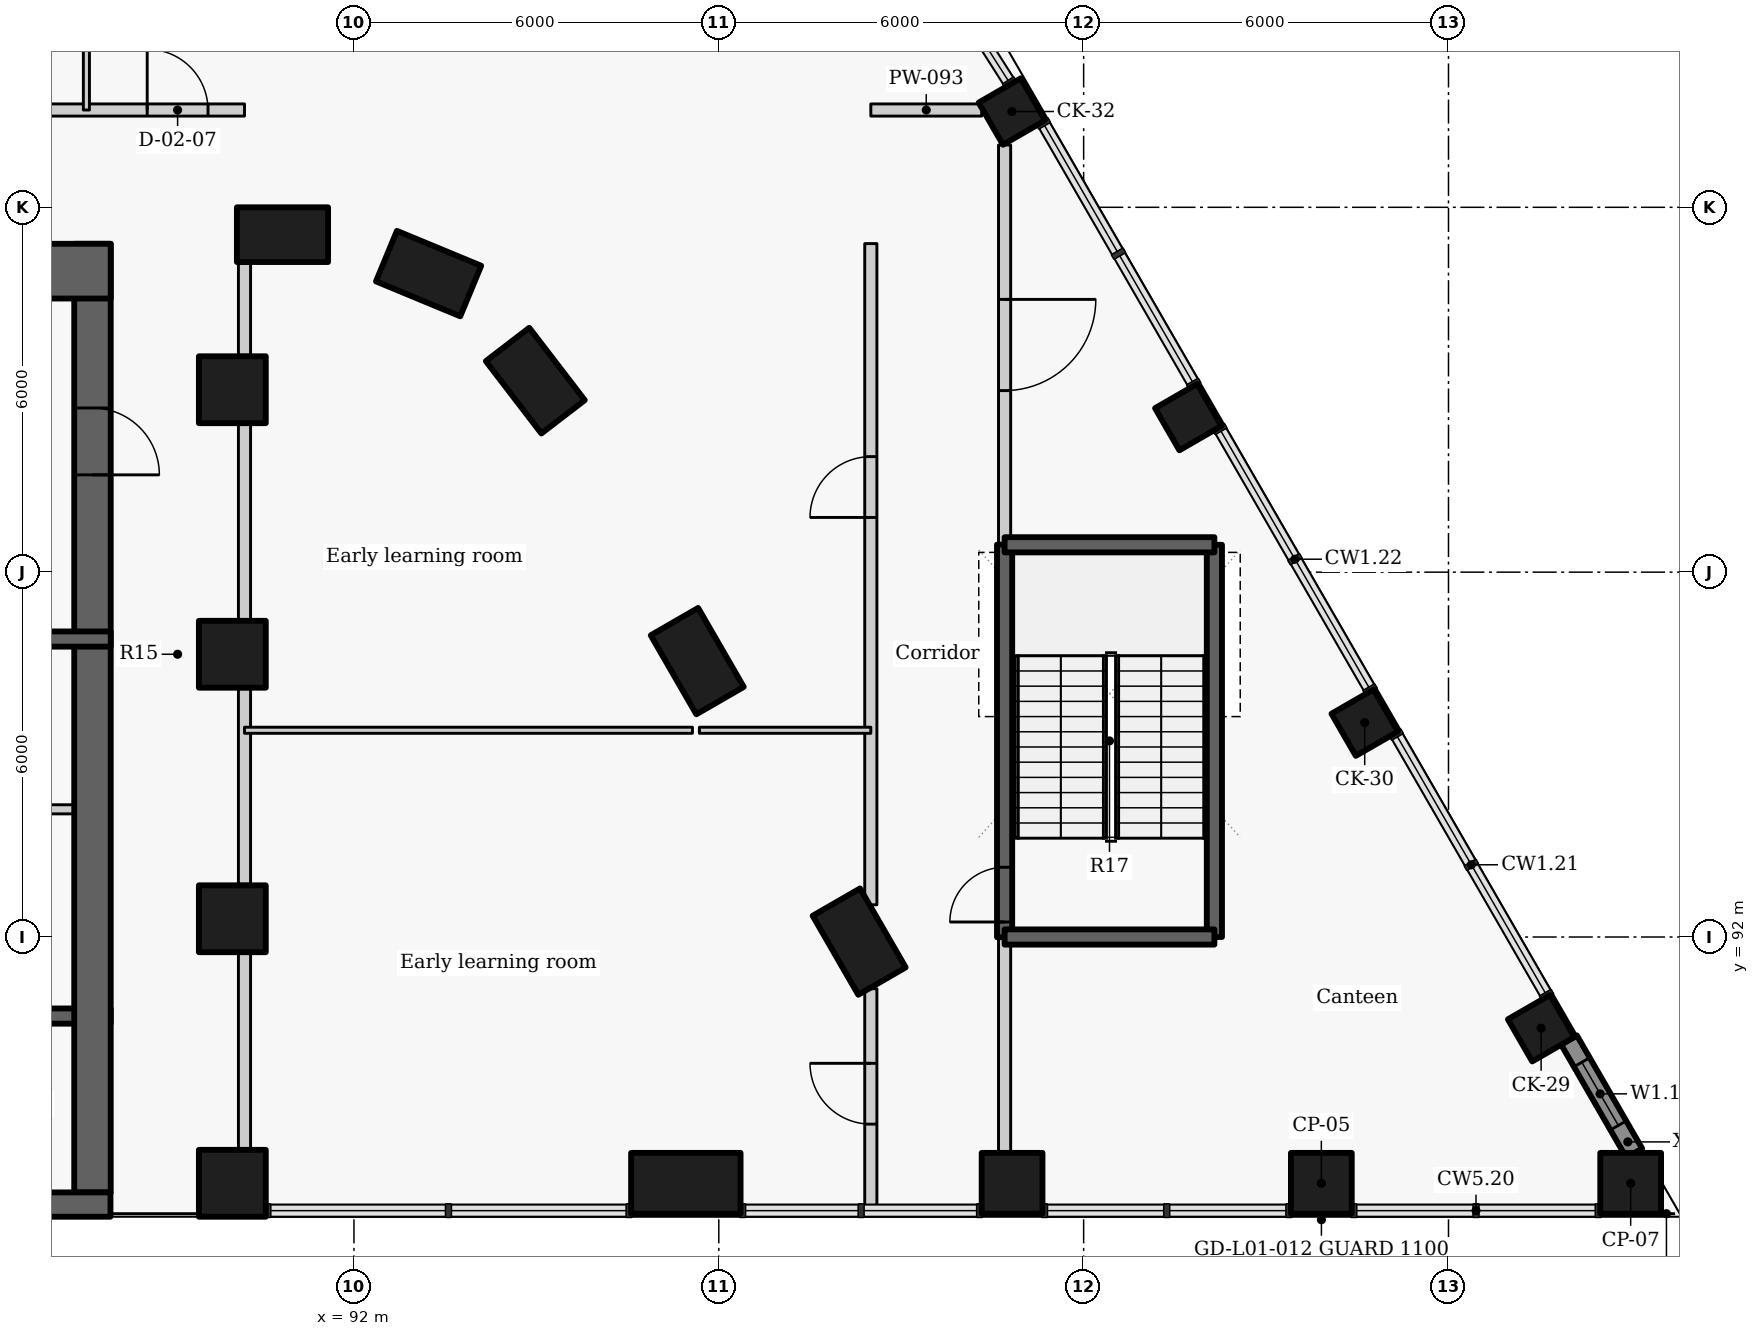
"""IFC4 building model, lengths in metres.
Left out: names, types, materials, properties, quantities, classifications, styles, units other than length and angle.
Written with IfcOpenShell. Run it as: python <this file> out.ifc"""

import sys

from ifc_helpers import new_model, si_unit, direction, frame, frame_2d, origin, origin_2d, place, context, subcontext, project, spatial, rectangle, extrude, element, fill, save


model = new_model("IFC4")
c1 = context("Model", 3, precision=1e-05, world=origin(), true_north=direction((0.0, 1.0)))
c2 = subcontext(c1, "Body", "Model", "MODEL_VIEW")
j1 = project(units=[si_unit("LENGTHUNIT", "METRE"), si_unit("PLANEANGLEUNIT", "RADIAN")], contexts=[c1])
p1 = place(None, origin())
s1 = spatial("IfcSite", under=j1, at=p1, CompositionType="ELEMENT")
p2 = place(p1, origin())
s2 = spatial("IfcBuilding", under=s1, at=p2, CompositionType="ELEMENT")
p3 = place(p2, frame((0.0, 0.0, 6.6)))
s3 = spatial("IfcBuildingStorey", under=s2, at=p3, CompositionType="ELEMENT", Elevation=6.6)
for number, where, z_axis, x_axis in (
    (1, (100.308, 91.925, 0.0), (0.0, 0.0, 1.0), (-0.5, 0.866, 0.0)),
    (2, (97.646, 96.537, 0.0), (0.0, 0.0, 1.0), (-0.5, 0.866, 0.0)),
    (3, (94.982, 101.149, 0.0), (0.0, 0.0, 1.0), (-0.609, 0.793, 0.0)),
    (4, (93.227, 102.91, 0.0), (0.0, 0.0, 1.0), (-0.924, 0.383, 0.0)),
    (5, (90.825, 103.55, 0.0), (0.0, 0.0, 1.0), (-1.0, 0.0, 0.0)),
):
    element("IfcColumn", number, at=place(p3, frame(where, z_axis=z_axis, x_axis=x_axis)), inside=s3, PredefinedType="COLUMN", context=c2, shape_type="SweptSolid", body=[
        extrude(rectangle(XDim=1.5, YDim=0.9, at=origin_2d()), origin(), (0.0, 0.0, 1.0), 4.8),
    ])
for number, where, z_axis, x_axis in (
    (6, (90.0, 87.95, 0.0), (0.0, 0.0, 1.0), (0.0, 1.0, 0.0)),
    (7, (90.0, 92.3, 0.0), (0.0, 0.0, 1.0), (0.0, 1.0, 0.0)),
    (8, (90.0, 96.65, 0.0), (0.0, 0.0, 1.0), (0.0, 1.0, 0.0)),
    (9, (90.0, 101.0, 0.0), (0.0, 0.0, 1.0), (0.0, 1.0, 0.0)),
):
    element("IfcColumn", number, at=place(p3, frame(where, z_axis=z_axis, x_axis=x_axis)), inside=s3, PredefinedType="COLUMN", context=c2, shape_type="SweptSolid", body=[
        extrude(rectangle(XDim=1.1, YDim=1.1, at=origin_2d()), origin(), (0.0, 0.0, 1.0), 4.8),
    ])
for number, where, z_axis, x_axis in (
    (10, (111.523, 90.5, 0.0), (0.0, 0.0, 1.0), (-0.5, 0.866, 0.0)),
    (11, (108.622, 95.525, 0.0), (0.0, 0.0, 1.0), (-0.5, 0.866, 0.0)),
    (12, (105.721, 100.55, 0.0), (0.0, 0.0, 1.0), (-0.5, 0.866, 0.0)),
    (13, (102.82, 105.575, 0.0), (0.0, 0.0, 1.0), (-0.5, 0.866, 0.0)),
):
    element("IfcColumn", number, at=place(p3, frame(where, z_axis=z_axis, x_axis=x_axis)), inside=s3, PredefinedType="COLUMN", context=c2, shape_type="SweptSolid", body=[
        extrude(rectangle(XDim=0.8, YDim=0.8, at=origin_2d()), origin(), (0.0, 0.0, 1.0), 4.8),
    ])
p4 = place(p3, frame((97.458, 87.95, 0.0), z_axis=(0.0, 0.0, 1.0), x_axis=(1.0, 0.0, 0.0)))
e14 = element("IfcColumn", 14, at=p4, inside=s3, PredefinedType="COLUMN", context=c2, shape_type="SweptSolid", body=[
    extrude(rectangle(XDim=1.8, YDim=1.0, at=origin_2d()), origin(), (0.0, 0.0, 1.0), 4.8),
])
for number, where, z_axis, x_axis in (
    (15, (102.823, 87.95, 0.0), (0.0, 0.0, 1.0), (1.0, 0.0, 0.0)),
    (16, (107.909, 87.95, 0.0), (0.0, 0.0, 1.0), (1.0, 0.0, 0.0)),
    (17, (112.996, 87.95, 0.0), (0.0, 0.0, 1.0), (1.0, 0.0, 0.0)),
):
    element("IfcColumn", number, at=place(p3, frame(where, z_axis=z_axis, x_axis=x_axis)), inside=s3, PredefinedType="COLUMN", context=c2, shape_type="SweptSolid", body=[
        extrude(rectangle(XDim=1.0, YDim=1.0, at=origin_2d()), origin(), (0.0, 0.0, 1.0), 4.8),
    ])
p5 = place(p3, frame((113.055, 88.447, 0.0), z_axis=(0.0, 0.0, 1.0), x_axis=(-0.499987977232, 0.866032345022, 0.0)))
e18 = element("IfcWall", 18, at=p5, inside=s3, PredefinedType="SOLIDWALL", context=c2, shape_type="SweptSolid", body=[
    extrude(rectangle(XDim=2.149, YDim=0.3, at=frame_2d((1.074, 0.0))), origin(), (0.0, 0.0, 1.0), 3.6),
])
p6 = place(p5, frame((0.525, 0.0, 0.9)))
e19 = element("IfcOpeningElement", 19, at=p6, cuts=e18, PredefinedType="OPENING", context=c2, shape_type="SweptSolid", body=[
    extrude(rectangle(XDim=1.2, YDim=2.05, at=frame_2d((0.6, 1.025))), frame((0.0, 0.16, 0.0), z_axis=(0.0, -1.0, 0.0), x_axis=(1.0, 0.0, 0.0)), (0.0, 0.0, 1.0), 0.32),
])
p7 = place(p3, frame((88.0, 90.7, -0.3), z_axis=(0.0, 0.0, 1.0), x_axis=(-1.0, 0.0, 0.0)))
e20 = element("IfcWall", 20, at=p7, inside=s3, PredefinedType="SHEAR", context=c2, shape_type="SweptSolid", body=[
    extrude(rectangle(XDim=2.6, YDim=0.25, at=frame_2d((1.3, 0.0))), origin(), (0.0, 0.0, 1.0), 4.8),
])
p8 = place(p7, frame((1.175, 0.0, 0.3)))
e21 = element("IfcOpeningElement", 21, at=p8, cuts=e20, PredefinedType="OPENING", context=c2, shape_type="SweptSolid", body=[
    extrude(rectangle(XDim=0.9, YDim=2.1, at=frame_2d((0.45, 1.05))), frame((0.0, 0.135, 0.0), z_axis=(0.0, -1.0, 0.0), x_axis=(1.0, 0.0, 0.0)), (0.0, 0.0, 1.0), 0.27),
])
p9 = place(p3, frame((87.7, 103.4, -0.3), z_axis=(0.0, 0.0, 1.0), x_axis=(0.0, -1.0, 0.0)))
e22 = element("IfcWall", 22, at=p9, inside=s3, PredefinedType="SHEAR", context=c2, shape_type="SweptSolid", body=[
    extrude(rectangle(XDim=15.6, YDim=0.6, at=frame_2d((7.8, 0.0))), origin(), (0.0, 0.0, 1.0), 4.8),
])
p10 = place(p9, frame((2.7, 0.0, 0.3)))
e23 = element("IfcOpeningElement", 23, at=p10, cuts=e22, PredefinedType="OPENING", context=c2, shape_type="SweptSolid", body=[
    extrude(rectangle(XDim=1.1, YDim=2.1, at=frame_2d((0.55, 1.05))), frame((0.0, 0.31, 0.0), z_axis=(0.0, -1.0, 0.0), x_axis=(1.0, 0.0, 0.0)), (0.0, 0.0, 1.0), 0.62),
])
p11 = place(p3, frame((85.397, 94.1, 0.0), z_axis=(0.0, 0.0, 1.0), x_axis=(1.0, 0.0, 0.0)))
e24 = element("IfcWall", 24, at=p11, inside=s3, PredefinedType="PARTITIONING", context=c2, shape_type="SweptSolid", body=[
    extrude(rectangle(XDim=2.603, YDim=0.15, at=frame_2d((1.302, 0.0))), origin(), (0.0, 0.0, 1.0), 4.5),
])
p12 = place(p11, frame((0.528, 0.0, 0.0)))
e25 = element("IfcOpeningElement", 25, at=p12, cuts=e24, PredefinedType="OPENING", context=c2, shape_type="SweptSolid", body=[
    extrude(rectangle(XDim=0.9, YDim=2.1, at=frame_2d((0.45, 1.05))), frame((0.0, 0.085, 0.0), z_axis=(0.0, -1.0, 0.0), x_axis=(1.0, 0.0, 0.0)), (0.0, 0.0, 1.0), 0.17),
])
p13 = place(p3, frame((80.0, 96.9, -0.3), z_axis=(0.0, 0.0, 1.0), x_axis=(1.0, 0.0, 0.0)))
e26 = element("IfcWall", 26, at=p13, inside=s3, PredefinedType="SHEAR", context=c2, shape_type="SweptSolid", body=[
    extrude(rectangle(XDim=8.0, YDim=0.25, at=frame_2d((4.0, 0.0))), origin(), (0.0, 0.0, 1.0), 4.8),
])
p14 = place(p13, frame((3.849, 0.0, 0.3)))
e27 = element("IfcOpeningElement", 27, at=p14, cuts=e26, PredefinedType="OPENING", context=c2, shape_type="SweptSolid", body=[
    extrude(rectangle(XDim=1.1, YDim=2.1, at=frame_2d((0.55, 1.05))), frame((0.0, 0.135, 0.0), z_axis=(0.0, -1.0, 0.0), x_axis=(1.0, 0.0, 0.0)), (0.0, 0.0, 1.0), 0.27),
])
p15 = place(p3, frame((83.4, 102.95, -0.3), z_axis=(0.0, 0.0, 1.0), x_axis=(1.0, 0.0, 0.0)))
e28 = element("IfcWall", 28, at=p15, inside=s3, PredefinedType="SHEAR", context=c2, shape_type="SweptSolid", body=[
    extrude(rectangle(XDim=4.6, YDim=0.9, at=frame_2d((2.3, 0.0))), origin(), (0.0, 0.0, 1.0), 4.8),
])
p16 = place(p15, frame((1.748, 0.0, 0.3)))
e29 = element("IfcOpeningElement", 29, at=p16, cuts=e28, PredefinedType="OPENING", context=c2, shape_type="SweptSolid", body=[
    extrude(rectangle(XDim=1.1, YDim=2.1, at=frame_2d((0.55, 1.05))), frame((0.0, 0.46, 0.0), z_axis=(0.0, -1.0, 0.0), x_axis=(1.0, 0.0, 0.0)), (0.0, 0.0, 1.0), 0.92),
])
p17 = place(p3, frame((102.7, 91.997, -0.3), z_axis=(0.0, 0.0, 1.0), x_axis=(0.0, 1.0, 0.0)))
e30 = element("IfcWall", 30, at=p17, inside=s3, PredefinedType="SHEAR", context=c2, shape_type="SweptSolid", body=[
    extrude(rectangle(XDim=6.456, YDim=0.25, at=frame_2d((3.228, 0.0))), origin(), (0.0, 0.0, 1.0), 4.8),
])
p18 = place(p17, frame((0.25, 0.0, 0.3)))
e31 = element("IfcOpeningElement", 31, at=p18, cuts=e30, PredefinedType="OPENING", context=c2, shape_type="SweptSolid", body=[
    extrude(rectangle(XDim=0.9, YDim=2.1, at=frame_2d((0.45, 1.05))), frame((0.0, 0.135, 0.0), z_axis=(0.0, -1.0, 0.0), x_axis=(1.0, 0.0, 0.0)), (0.0, 0.0, 1.0), 0.27),
])
p19 = place(p3, frame((102.7, 88.467, 0.0), z_axis=(0.0, 0.0, 1.0), x_axis=(0.0, 1.0, 0.0)))
e32 = element("IfcWall", 32, at=p19, inside=s3, PredefinedType="PARTITIONING", context=c2, shape_type="SweptSolid", body=[
    extrude(rectangle(XDim=3.536, YDim=0.2, at=frame_2d((1.768, 0.0))), origin(), (0.0, 0.0, 1.0), 4.5),
])
p20 = place(p3, frame((102.7, 105.025, 0.0), z_axis=(0.0, 0.0, 1.0), x_axis=(0.0, -1.0, 0.0)))
e33 = element("IfcWall", 33, at=p20, inside=s3, PredefinedType="PARTITIONING", context=c2, shape_type="SweptSolid", body=[
    extrude(rectangle(XDim=6.578, YDim=0.2, at=frame_2d((3.289, 0.0))), origin(), (0.0, 0.0, 1.0), 4.5),
])
p21 = place(p20, frame((2.539, 0.0, 0.0)))
e34 = element("IfcOpeningElement", 34, at=p21, cuts=e33, PredefinedType="OPENING", context=c2, shape_type="SweptSolid", body=[
    extrude(rectangle(XDim=1.5, YDim=2.1, at=frame_2d((0.75, 1.05))), frame((0.0, 0.11, 0.0), z_axis=(0.0, -1.0, 0.0), x_axis=(1.0, 0.0, 0.0)), (0.0, 0.0, 1.0), 0.22),
])
p22 = place(p3, frame((100.5, 87.58, 0.0), z_axis=(0.0, 0.0, 1.0), x_axis=(0.0, 1.0, 0.0)))
e35 = element("IfcWall", 35, at=p22, inside=s3, PredefinedType="PARTITIONING", context=c2, shape_type="SweptSolid", body=[
    extrude(rectangle(XDim=3.569, YDim=0.2, at=frame_2d((1.785, 0.0))), origin(), (0.0, 0.0, 1.0), 3.73),
])
p23 = place(p22, frame((1.343, 0.0, 0.0)))
e36 = element("IfcOpeningElement", 36, at=p23, cuts=e35, PredefinedType="OPENING", context=c2, shape_type="SweptSolid", body=[
    extrude(rectangle(XDim=1.0, YDim=2.1, at=frame_2d((0.5, 1.05))), frame((0.0, 0.11, 0.0), z_axis=(0.0, -1.0, 0.0), x_axis=(1.0, 0.0, 0.0)), (0.0, 0.0, 1.0), 0.22),
])
p24 = place(p3, frame((100.5, 92.53, 0.0), z_axis=(0.0, 0.0, 1.0), x_axis=(0.0, 1.0, 0.0)))
e37 = element("IfcWall", 37, at=p24, inside=s3, PredefinedType="PARTITIONING", context=c2, shape_type="SweptSolid", body=[
    extrude(rectangle(XDim=10.873, YDim=0.2, at=frame_2d((5.437, 0.0))), origin(), (0.0, 0.0, 1.0), 4.5),
])
p25 = place(p24, frame((6.37, 0.0, 0.0)))
e38 = element("IfcOpeningElement", 38, at=p25, cuts=e37, PredefinedType="OPENING", context=c2, shape_type="SweptSolid", body=[
    extrude(rectangle(XDim=1.0, YDim=2.1, at=frame_2d((0.5, 1.05))), frame((0.0, 0.11, 0.0), z_axis=(0.0, -1.0, 0.0), x_axis=(1.0, 0.0, 0.0)), (0.0, 0.0, 1.0), 0.22),
])
p26 = place(p3, frame((69.8, 105.6, 0.0), z_axis=(0.0, 0.0, 1.0), x_axis=(1.0, 0.0, 0.0)))
e39 = element("IfcWall", 39, at=p26, inside=s3, PredefinedType="PARTITIONING", context=c2, shape_type="SweptSolid", body=[
    extrude(rectangle(XDim=20.4, YDim=0.2, at=frame_2d((10.2, 0.0))), origin(), (0.0, 0.0, 1.0), 4.5),
])
p27 = place(p26, frame((0.602, 0.0, 0.0)))
e40 = element("IfcOpeningElement", 40, at=p27, cuts=e39, PredefinedType="OPENING", context=c2, shape_type="SweptSolid", body=[
    extrude(rectangle(XDim=1.0, YDim=2.1, at=frame_2d((0.5, 1.05))), frame((0.0, 0.11, 0.0), z_axis=(0.0, -1.0, 0.0), x_axis=(1.0, 0.0, 0.0)), (0.0, 0.0, 1.0), 0.22),
])
p28 = place(p26, frame((18.8, 0.0, 0.0)))
e41 = element("IfcOpeningElement", 41, at=p28, cuts=e39, PredefinedType="OPENING", context=c2, shape_type="SweptSolid", body=[
    extrude(rectangle(XDim=1.0, YDim=2.1, at=frame_2d((0.5, 1.05))), frame((0.0, 0.11, 0.0), z_axis=(0.0, -1.0, 0.0), x_axis=(1.0, 0.0, 0.0)), (0.0, 0.0, 1.0), 0.22),
])
p29 = place(p26, frame((10.3, 0.0, 0.0)))
e42 = element("IfcOpeningElement", 42, at=p29, cuts=e39, PredefinedType="OPENING", context=c2, shape_type="SweptSolid", body=[
    extrude(rectangle(XDim=1.0, YDim=2.1, at=frame_2d((0.5, 1.05))), frame((0.0, 0.11, 0.0), z_axis=(0.0, -1.0, 0.0), x_axis=(1.0, 0.0, 0.0)), (0.0, 0.0, 1.0), 0.22),
])
p30 = place(p3, frame((100.5, 105.6, 0.0), z_axis=(0.0, 0.0, 1.0), x_axis=(1.0, 0.0, 0.0)))
e43 = element("IfcWall", 43, at=p30, inside=s3, PredefinedType="PARTITIONING", context=c2, shape_type="SweptSolid", body=[
    extrude(rectangle(XDim=1.823, YDim=0.2, at=frame_2d((0.912, 0.0))), origin(), (0.0, 0.0, 1.0), 4.5),
])
p31 = place(p3, frame((90.2, 88.517, 0.0), z_axis=(0.0, 0.0, 1.0), x_axis=(0.0, 1.0, 0.0)))
e44 = element("IfcWall", 44, at=p31, inside=s3, PredefinedType="PARTITIONING", context=c2, shape_type="SweptSolid", body=[
    extrude(rectangle(XDim=3.216, YDim=0.2, at=frame_2d((1.608, 0.0))), origin(), (0.0, 0.0, 1.0), 3.73),
])
for number, where, z_axis, x_axis in (
    (45, (90.2, 92.867, 0.0), (0.0, 0.0, 1.0), (0.0, 1.0, 0.0)),
    (46, (90.2, 97.217, 0.0), (0.0, 0.0, 1.0), (0.0, 1.0, 0.0)),
):
    element("IfcWall", number, at=place(p3, frame(where, z_axis=z_axis, x_axis=x_axis)), inside=s3, PredefinedType="PARTITIONING", context=c2, shape_type="SweptSolid", body=[
        extrude(rectangle(XDim=3.216, YDim=0.2, at=frame_2d((1.608, 0.0))), origin(), (0.0, 0.0, 1.0), 3.73),
    ])
p32 = place(p3, frame((90.2, 101.567, 0.0), z_axis=(0.0, 0.0, 1.0), x_axis=(0.0, 1.0, 0.0)))
e47 = element("IfcWall", 47, at=p32, inside=s3, PredefinedType="PARTITIONING", context=c2, shape_type="SweptSolid", body=[
    extrude(rectangle(XDim=1.516, YDim=0.2, at=frame_2d((0.758, 0.0))), origin(), (0.0, 0.0, 1.0), 4.5),
])
p33 = place(p3, frame((106.15, 92.0, -0.3), z_axis=(0.0, 0.0, 1.0), x_axis=(0.0, 1.0, 0.0)))
e48 = element("IfcWall", 48, at=p33, inside=s3, PredefinedType="SHEAR", context=c2, shape_type="SweptSolid", body=[
    extrude(rectangle(XDim=6.45, YDim=0.25, at=frame_2d((3.225, 0.0))), origin(), (0.0, 0.0, 1.0), 4.8),
])
for number, where, z_axis, x_axis in (
    (49, (102.7, 98.45, -0.3), (0.0, 0.0, 1.0), (1.0, 0.0, 0.0)),
    (50, (102.7, 92.0, -0.3), (0.0, 0.0, 1.0), (1.0, 0.0, 0.0)),
):
    element("IfcWall", number, at=place(p3, frame(where, z_axis=z_axis, x_axis=x_axis)), inside=s3, PredefinedType="SHEAR", context=c2, shape_type="SweptSolid", body=[
        extrude(rectangle(XDim=3.45, YDim=0.25, at=frame_2d((1.725, 0.0))), origin(), (0.0, 0.0, 1.0), 4.8),
    ])
p34 = place(p3, frame((90.2, 95.4, 0.0), z_axis=(0.0, 0.0, 1.0), x_axis=(1.0, 0.0, 0.0)))
e51 = element("IfcWall", 51, at=p34, inside=s3, PredefinedType="PARTITIONING", context=c2, shape_type="SweptSolid", body=[
    extrude(rectangle(XDim=7.366, YDim=0.1, at=frame_2d((3.683, 0.0))), origin(), (0.0, 0.0, 1.0), 4.5),
])
p35 = place(p3, frame((97.68, 95.4, 0.0), z_axis=(0.0, 0.0, 1.0), x_axis=(1.0, 0.0, 0.0)))
e52 = element("IfcWall", 52, at=p35, inside=s3, PredefinedType="PARTITIONING", context=c2, shape_type="SweptSolid", body=[
    extrude(rectangle(XDim=2.82, YDim=0.1, at=frame_2d((1.41, 0.0))), origin(), (0.0, 0.0, 1.0), 3.58),
])
p36 = place(p3, frame((87.6, 105.6, 0.0), z_axis=(0.0, 0.0, 1.0), x_axis=(0.0, 1.0, 0.0)))
e53 = element("IfcWall", 53, at=p36, inside=s3, PredefinedType="PARTITIONING", context=c2, shape_type="SweptSolid", body=[
    extrude(rectangle(XDim=7.1, YDim=0.1, at=frame_2d((3.55, 0.0))), origin(), (0.0, 0.0, 1.0), 3.73),
])
p37 = place(p3, frame((72.004, 87.6, -0.3), z_axis=(0.0, 0.0, 1.0), x_axis=(1.0, 0.0, 0.0)))
e54 = element("IfcWall", 54, at=p37, inside=s3, PredefinedType="SHEAR", context=c2, shape_type="SweptSolid", body=[
    extrude(rectangle(XDim=15.992, YDim=0.4, at=frame_2d((7.996, 0.0))), origin(), (0.0, 0.0, 1.0), 4.8),
])
p38 = place(p6, origin())
e55 = element("IfcWindow", 55, at=p38, inside=s3, PartitioningType="SINGLE_PANEL", PredefinedType="WINDOW", context=c2, shape_type="SweptSolid", body=[
    extrude(rectangle(XDim=1.2, YDim=2.05, at=frame_2d((0.6, 1.025))), frame((0.0, 0.03, 0.0), z_axis=(0.0, -1.0, 0.0), x_axis=(1.0, 0.0, 0.0)), (0.0, 0.0, 1.0), 0.06),
])
fill(e19, e55)
p39 = place(p18, origin())
e56 = element("IfcDoor", 56, at=p39, inside=s3, OperationType="SINGLE_SWING_LEFT", PredefinedType="DOOR", context=c2, shape_type="SweptSolid", body=[
    extrude(rectangle(XDim=0.9, YDim=2.1, at=frame_2d((0.45, 1.05))), frame((0.0, 0.025, 0.0), z_axis=(0.0, -1.0, 0.0), x_axis=(1.0, 0.0, 0.0)), (0.0, 0.0, 1.0), 0.05),
])
fill(e31, e56)
p40 = place(p21, origin())
e57 = element("IfcDoor", 57, at=p40, inside=s3, OperationType="DOUBLE_DOOR_SINGLE_SWING", PredefinedType="DOOR", context=c2, shape_type="SweptSolid", body=[
    extrude(rectangle(XDim=1.5, YDim=2.1, at=frame_2d((0.75, 1.05))), frame((0.0, 0.025, 0.0), z_axis=(0.0, -1.0, 0.0), x_axis=(1.0, 0.0, 0.0)), (0.0, 0.0, 1.0), 0.05),
])
fill(e34, e57)
p41 = place(p23, origin())
e58 = element("IfcDoor", 58, at=p41, inside=s3, OperationType="SINGLE_SWING_RIGHT", PredefinedType="DOOR", context=c2, shape_type="SweptSolid", body=[
    extrude(rectangle(XDim=1.0, YDim=2.1, at=frame_2d((0.5, 1.05))), frame((0.0, 0.025, 0.0), z_axis=(0.0, -1.0, 0.0), x_axis=(1.0, 0.0, 0.0)), (0.0, 0.0, 1.0), 0.05),
])
fill(e36, e58)
p42 = place(p25, origin())
e59 = element("IfcDoor", 59, at=p42, inside=s3, OperationType="SINGLE_SWING_LEFT", PredefinedType="DOOR", context=c2, shape_type="SweptSolid", body=[
    extrude(rectangle(XDim=1.0, YDim=2.1, at=frame_2d((0.5, 1.05))), frame((0.0, 0.025, 0.0), z_axis=(0.0, -1.0, 0.0), x_axis=(1.0, 0.0, 0.0)), (0.0, 0.0, 1.0), 0.05),
])
fill(e38, e59)
p43 = place(p28, origin())
e60 = element("IfcDoor", 60, at=p43, inside=s3, OperationType="SINGLE_SWING_LEFT", PredefinedType="DOOR", context=c2, shape_type="SweptSolid", body=[
    extrude(rectangle(XDim=1.0, YDim=2.1, at=frame_2d((0.5, 1.05))), frame((0.0, 0.025, 0.0), z_axis=(0.0, -1.0, 0.0), x_axis=(1.0, 0.0, 0.0)), (0.0, 0.0, 1.0), 0.05),
])
fill(e41, e60)
p44 = place(p10, origin())
e61 = element("IfcDoor", 61, at=p44, inside=s3, OperationType="SINGLE_SWING_RIGHT", PredefinedType="DOOR", context=c2, shape_type="SweptSolid", body=[
    extrude(rectangle(XDim=1.1, YDim=2.1, at=frame_2d((0.55, 1.05))), frame((0.0, 0.025, 0.0), z_axis=(0.0, -1.0, 0.0), x_axis=(1.0, 0.0, 0.0)), (0.0, 0.0, 1.0), 0.05),
])
fill(e23, e61)
save(model, sys.argv[1])
